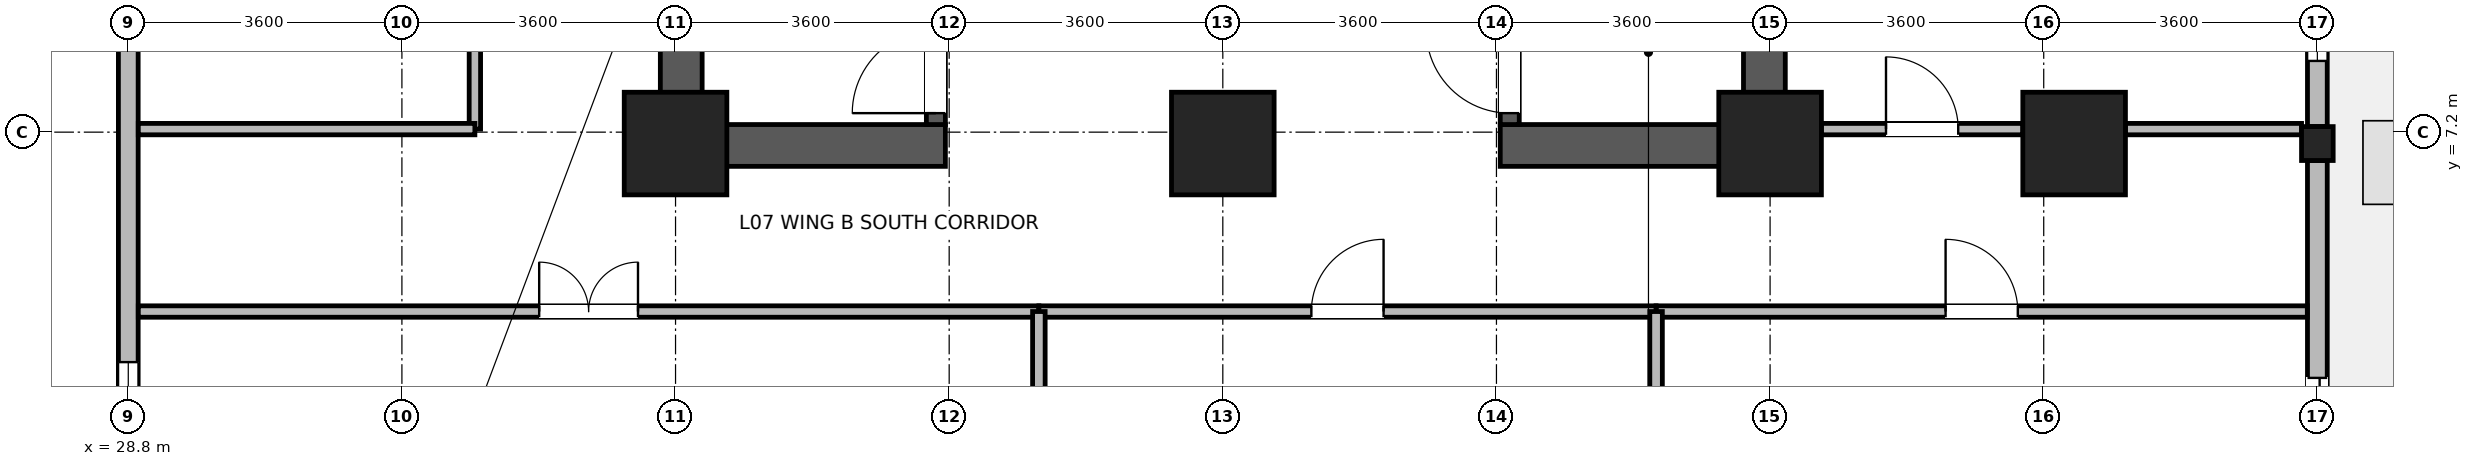
"""IFC4 building model, lengths in metres.
Left out: names, types, materials, properties, quantities, classifications, styles, units other than length and angle.
Written with IfcOpenShell. Run it as: python <this file> out.ifc"""

import sys

from ifc_helpers import new_model, si_unit, direction, frame, frame_2d, origin, origin_2d, place, context, subcontext, project, spatial, rectangle, i_section, extrude, source, transform, mapped, element, fill, save


model = new_model("IFC4")
c1 = context("Model", 3, precision=1e-05, world=origin(), true_north=direction((0.0, 1.0)))
c2 = subcontext(c1, "Body", "Model", "MODEL_VIEW")
j1 = project(units=[si_unit("LENGTHUNIT", "METRE"), si_unit("PLANEANGLEUNIT", "RADIAN")], contexts=[c1])
p1 = place(None, origin())
s1 = spatial("IfcSite", under=j1, at=p1, CompositionType="ELEMENT")
p2 = place(p1, origin())
s2 = spatial("IfcBuilding", under=s1, at=p2, CompositionType="ELEMENT")
p3 = place(p2, frame((0.0, 0.0, 32.7)))
s3 = spatial("IfcBuildingStorey", under=s2, at=p3, CompositionType="ELEMENT", Elevation=32.7)
for number, where, z_axis, x_axis in (
    (1, (36.075, 6.75, 0.0), (0.0, 0.0, 1.0), (0.0, 1.0, 0.0)),
    (2, (50.325, 6.75, 0.0), (0.0, 0.0, 1.0), (0.0, 1.0, 0.0)),
):
    element("IfcWall", number, at=place(p3, frame(where, z_axis=z_axis, x_axis=x_axis)), inside=s3, PredefinedType="SHEAR", context=c2, shape_type="SweptSolid", body=[
        extrude(rectangle(XDim=8.1, YDim=0.55, at=frame_2d((4.05, 0.0))), origin(), (0.0, 0.0, 1.0), 3.45),
    ])
for number, where, z_axis, x_axis in (
    (3, (36.35, 7.025, 0.0), (0.0, 0.0, 1.0), (1.0, 0.0, 0.0)),
    (4, (46.85, 7.025, 0.0), (0.0, 0.0, 1.0), (1.0, 0.0, 0.0)),
):
    element("IfcWall", number, at=place(p3, frame(where, z_axis=z_axis, x_axis=x_axis)), inside=s3, PredefinedType="SHEAR", context=c2, shape_type="SweptSolid", body=[
        extrude(rectangle(XDim=3.2, YDim=0.55, at=frame_2d((1.6, 0.0))), origin(), (0.0, 0.0, 1.0), 3.45),
    ])
p4 = place(p3, frame((39.425, 7.3, 0.0), z_axis=(0.0, 0.0, 1.0), x_axis=(0.0, 1.0, 0.0)))
e5 = element("IfcWall", 5, at=p4, inside=s3, PredefinedType="SHEAR", context=c2, shape_type="SweptSolid", body=[
    extrude(rectangle(XDim=7.0, YDim=0.25, at=frame_2d((3.5, 0.0))), origin(), (0.0, 0.0, 1.0), 3.45),
])
p5 = place(p4, frame((0.15, 0.0, 0.0)))
e6 = element("IfcOpeningElement", 6, at=p5, cuts=e5, PredefinedType="OPENING", context=c2, shape_type="SweptSolid", body=[
    extrude(rectangle(XDim=1.1, YDim=2.08, at=frame_2d((0.55, 1.04))), frame((0.0, 0.135, 0.0), z_axis=(0.0, -1.0, 0.0), x_axis=(1.0, 0.0, 0.0)), (0.0, 0.0, 1.0), 0.27),
])
p6 = place(p3, frame((46.975, 7.3, 0.0), z_axis=(0.0, 0.0, 1.0), x_axis=(0.0, 1.0, 0.0)))
e7 = element("IfcWall", 7, at=p6, inside=s3, PredefinedType="SHEAR", context=c2, shape_type="SweptSolid", body=[
    extrude(rectangle(XDim=7.0, YDim=0.25, at=frame_2d((3.5, 0.0))), origin(), (0.0, 0.0, 1.0), 3.45),
])
p7 = place(p6, frame((0.15, 0.0, 0.0)))
e8 = element("IfcOpeningElement", 8, at=p7, cuts=e7, PredefinedType="OPENING", context=c2, shape_type="SweptSolid", body=[
    extrude(rectangle(XDim=1.1, YDim=2.08, at=frame_2d((0.55, 1.04))), frame((0.0, 0.135, 0.0), z_axis=(0.0, -1.0, 0.0), x_axis=(1.0, 0.0, 0.0)), (0.0, 0.0, 1.0), 0.27),
])
m1 = source(origin(), c2, "Body", "SweptSolid", [
    extrude(rectangle(XDim=1.35, YDim=1.35, at=origin_2d()), origin(), (0.0, 0.0, 1.0), 3.7),
])
for number, where, z_axis, x_axis in (
    (9, (36.0, 7.05, 0.0), (0.0, 0.0, 1.0), (1.0, 0.0, 0.0)),
    (10, (43.2, 7.05, 0.0), (0.0, 0.0, 1.0), (1.0, 0.0, 0.0)),
    (11, (50.4, 7.05, 0.0), (0.0, 0.0, 1.0), (1.0, 0.0, 0.0)),
    (12, (54.4, 7.05, 0.0), (0.0, 0.0, 1.0), (1.0, 0.0, 0.0)),
):
    element("IfcColumn", number, at=place(p3, frame(where, z_axis=z_axis, x_axis=x_axis)), inside=s3, PredefinedType="COLUMN", context=c2, shape_type="MappedRepresentation", body=[
        mapped(m1, transform((0.0, 0.0, 0.0), x_axis=(1.0, 0.0, 0.0), y_axis=(0.0, 1.0, 0.0), z_axis=(0.0, 0.0, 1.0), scale=1.0)),
    ])
m2 = source(origin(), c2, "Body", "SweptSolid", [
    extrude(i_section(OverallWidth=0.416, OverallDepth=0.446, WebThickness=0.029, FlangeThickness=0.04, FilletRadius=0.015, at=origin_2d()), origin(), (0.0, 0.0, 1.0), 3.7),
])
p8 = place(p3, frame((57.6, 7.05, 0.0), z_axis=(0.0, 0.0, 1.0), x_axis=(1.0, 0.0, 0.0)))
e13 = element("IfcColumn", 13, at=p8, inside=s3, PredefinedType="COLUMN", context=c2, shape_type="MappedRepresentation", body=[
    mapped(m2, transform((0.0, 0.0, 0.0), x_axis=(1.0, 0.0, 0.0), y_axis=(0.0, 1.0, 0.0), z_axis=(0.0, 0.0, 1.0), scale=1.0)),
])
p9 = place(p3, frame((57.6, 6.826, 0.0), z_axis=(0.0, 0.0, 1.0), x_axis=(0.0, -1.0, 0.0)))
e14 = element("IfcWall", 14, at=p9, inside=s3, PredefinedType="STANDARD", context=c2, shape_type="SweptSolid", body=[
    extrude(rectangle(XDim=5.156, YDim=0.26, at=frame_2d((2.578, 0.0))), origin(), (0.0, 0.0, 1.0), 3.43),
])
p10 = place(p9, frame((2.859, 0.0, 0.0)))
e15 = element("IfcOpeningElement", 15, at=p10, cuts=e14, PredefinedType="OPENING", context=c2, shape_type="SweptSolid", body=[
    extrude(rectangle(XDim=1.5, YDim=2.15, at=frame_2d((0.75, 1.075))), frame((0.0, 0.14, 0.0), z_axis=(0.0, -1.0, 0.0), x_axis=(1.0, 0.0, 0.0)), (0.0, 0.0, 1.0), 0.28),
])
p11 = place(p3, frame((57.6, 14.326, 0.0), z_axis=(0.0, 0.0, 1.0), x_axis=(0.0, -1.0, 0.0)))
e16 = element("IfcWall", 16, at=p11, inside=s3, PredefinedType="STANDARD", context=c2, shape_type="SweptSolid", body=[
    extrude(rectangle(XDim=7.052, YDim=0.26, at=frame_2d((3.526, 0.0))), origin(), (0.0, 0.0, 1.0), 2.93),
])
p12 = place(p11, frame((0.863, 0.0, 0.85)))
e17 = element("IfcOpeningElement", 17, at=p12, cuts=e16, PredefinedType="OPENING", context=c2, shape_type="SweptSolid", body=[
    extrude(rectangle(XDim=1.8, YDim=1.85, at=frame_2d((0.9, 0.925))), frame((0.0, 0.14, 0.0), z_axis=(0.0, -1.0, 0.0), x_axis=(1.0, 0.0, 0.0)), (0.0, 0.0, 1.0), 0.28),
])
p13 = place(p11, frame((4.389, 0.0, 0.85)))
e18 = element("IfcOpeningElement", 18, at=p13, cuts=e16, PredefinedType="OPENING", context=c2, shape_type="SweptSolid", body=[
    extrude(rectangle(XDim=1.8, YDim=1.85, at=frame_2d((0.9, 0.925))), frame((0.0, 0.14, 0.0), z_axis=(0.0, -1.0, 0.0), x_axis=(1.0, 0.0, 0.0)), (0.0, 0.0, 1.0), 0.28),
])
p14 = place(p3, frame((28.8, 1.67, 0.0), z_axis=(0.0, 0.0, 1.0), x_axis=(0.0, 1.0, 0.0)))
e19 = element("IfcWall", 19, at=p14, inside=s3, PredefinedType="STANDARD", context=c2, shape_type="SweptSolid", body=[
    extrude(rectangle(XDim=19.254, YDim=0.26, at=frame_2d((9.627, 0.0))), origin(), (0.0, 0.0, 1.0), 3.43),
])
p15 = place(p14, frame((0.705, 0.0, 0.85)))
e20 = element("IfcOpeningElement", 20, at=p15, cuts=e19, PredefinedType="OPENING", context=c2, shape_type="SweptSolid", body=[
    extrude(rectangle(XDim=1.8, YDim=1.85, at=frame_2d((0.9, 0.925))), frame((0.0, 0.14, 0.0), z_axis=(0.0, -1.0, 0.0), x_axis=(1.0, 0.0, 0.0)), (0.0, 0.0, 1.0), 0.28),
])
p16 = place(p14, frame((7.123, 0.0, 0.85)))
e21 = element("IfcOpeningElement", 21, at=p16, cuts=e19, PredefinedType="OPENING", context=c2, shape_type="SweptSolid", body=[
    extrude(rectangle(XDim=1.8, YDim=1.85, at=frame_2d((0.9, 0.925))), frame((0.0, 0.14, 0.0), z_axis=(0.0, -1.0, 0.0), x_axis=(1.0, 0.0, 0.0)), (0.0, 0.0, 1.0), 0.28),
])
p17 = place(p14, frame((10.332, 0.0, 0.85)))
e22 = element("IfcOpeningElement", 22, at=p17, cuts=e19, PredefinedType="OPENING", context=c2, shape_type="SweptSolid", body=[
    extrude(rectangle(XDim=1.8, YDim=1.85, at=frame_2d((0.9, 0.925))), frame((0.0, 0.14, 0.0), z_axis=(0.0, -1.0, 0.0), x_axis=(1.0, 0.0, 0.0)), (0.0, 0.0, 1.0), 0.28),
])
p18 = place(p14, frame((13.541, 0.0, 0.85)))
e23 = element("IfcOpeningElement", 23, at=p18, cuts=e19, PredefinedType="OPENING", context=c2, shape_type="SweptSolid", body=[
    extrude(rectangle(XDim=1.8, YDim=1.85, at=frame_2d((0.9, 0.925))), frame((0.0, 0.14, 0.0), z_axis=(0.0, -1.0, 0.0), x_axis=(1.0, 0.0, 0.0)), (0.0, 0.0, 1.0), 0.28),
])
p19 = place(p14, frame((16.75, 0.0, 0.85)))
e24 = element("IfcOpeningElement", 24, at=p19, cuts=e19, PredefinedType="OPENING", context=c2, shape_type="SweptSolid", body=[
    extrude(rectangle(XDim=1.8, YDim=1.85, at=frame_2d((0.9, 0.925))), frame((0.0, 0.14, 0.0), z_axis=(0.0, -1.0, 0.0), x_axis=(1.0, 0.0, 0.0)), (0.0, 0.0, 1.0), 0.28),
])
p20 = place(p3, frame((28.932, 4.84, 0.0), z_axis=(0.0, 0.0, 1.0), x_axis=(1.0, 0.0, 0.0)))
e25 = element("IfcWall", 25, at=p20, inside=s3, PredefinedType="PARTITIONING", context=c2, shape_type="SweptSolid", body=[
    extrude(rectangle(XDim=11.848, YDim=0.15, at=frame_2d((5.924, 0.0))), origin(), (0.0, 0.0, 1.0), 3.43),
])
p21 = place(p20, frame((5.274, 0.0, 0.0)))
e26 = element("IfcOpeningElement", 26, at=p21, cuts=e25, PredefinedType="OPENING", context=c2, shape_type="SweptSolid", body=[
    extrude(rectangle(XDim=1.3, YDim=2.12, at=frame_2d((0.65, 1.06))), frame((0.0, 0.085, 0.0), z_axis=(0.0, -1.0, 0.0), x_axis=(1.0, 0.0, 0.0)), (0.0, 0.0, 1.0), 0.17),
])
p22 = place(p3, frame((48.9, 4.84, 0.0), z_axis=(0.0, 0.0, 1.0), x_axis=(1.0, 0.0, 0.0)))
e27 = element("IfcWall", 27, at=p22, inside=s3, PredefinedType="PARTITIONING", context=c2, shape_type="SweptSolid", body=[
    extrude(rectangle(XDim=8.568, YDim=0.15, at=frame_2d((4.284, 0.0))), origin(), (0.0, 0.0, 1.0), 3.43),
])
p23 = place(p22, frame((3.809, 0.0, 0.0)))
e28 = element("IfcOpeningElement", 28, at=p23, cuts=e27, PredefinedType="OPENING", context=c2, shape_type="SweptSolid", body=[
    extrude(rectangle(XDim=0.95, YDim=2.1, at=frame_2d((0.475, 1.05))), frame((0.0, 0.085, 0.0), z_axis=(0.0, -1.0, 0.0), x_axis=(1.0, 0.0, 0.0)), (0.0, 0.0, 1.0), 0.17),
])
p24 = place(p3, frame((40.78, 4.84, 0.0), z_axis=(0.0, 0.0, 1.0), x_axis=(1.0, 0.0, 0.0)))
e29 = element("IfcWall", 29, at=p24, inside=s3, PredefinedType="PARTITIONING", context=c2, shape_type="SweptSolid", body=[
    extrude(rectangle(XDim=8.12, YDim=0.15, at=frame_2d((4.06, 0.0))), origin(), (0.0, 0.0, 1.0), 3.43),
])
p25 = place(p24, frame((3.585, 0.0, 0.0)))
e30 = element("IfcOpeningElement", 30, at=p25, cuts=e29, PredefinedType="OPENING", context=c2, shape_type="SweptSolid", body=[
    extrude(rectangle(XDim=0.95, YDim=2.1, at=frame_2d((0.475, 1.05))), frame((0.0, 0.085, 0.0), z_axis=(0.0, -1.0, 0.0), x_axis=(1.0, 0.0, 0.0)), (0.0, 0.0, 1.0), 0.17),
])
p26 = place(p3, frame((33.36, 7.24, 0.0), z_axis=(0.0, 0.0, 1.0), x_axis=(0.0, 1.0, 0.0)))
e31 = element("IfcWall", 31, at=p26, inside=s3, PredefinedType="PARTITIONING", context=c2, shape_type="SweptSolid", body=[
    extrude(rectangle(XDim=7.26, YDim=0.15, at=frame_2d((3.63, 0.0))), origin(), (0.0, 0.0, 1.0), 3.43),
])
p27 = place(p26, frame((2.98, 0.0, 0.0)))
e32 = element("IfcOpeningElement", 32, at=p27, cuts=e31, PredefinedType="OPENING", context=c2, shape_type="SweptSolid", body=[
    extrude(rectangle(XDim=1.3, YDim=2.12, at=frame_2d((0.65, 1.06))), frame((0.0, 0.085, 0.0), z_axis=(0.0, -1.0, 0.0), x_axis=(1.0, 0.0, 0.0)), (0.0, 0.0, 1.0), 0.17),
])
p28 = place(p3, frame((51.075, 7.24, 0.0), z_axis=(0.0, 0.0, 1.0), x_axis=(1.0, 0.0, 0.0)))
e33 = element("IfcWall", 33, at=p28, inside=s3, PredefinedType="PARTITIONING", context=c2, shape_type="SweptSolid", body=[
    extrude(rectangle(XDim=2.65, YDim=0.15, at=frame_2d((1.325, 0.0))), origin(), (0.0, 0.0, 1.0), 2.78),
])
p29 = place(p28, frame((0.85, 0.0, 0.0)))
e34 = element("IfcOpeningElement", 34, at=p29, cuts=e33, PredefinedType="OPENING", context=c2, shape_type="SweptSolid", body=[
    extrude(rectangle(XDim=0.95, YDim=2.1, at=frame_2d((0.475, 1.05))), frame((0.0, 0.085, 0.0), z_axis=(0.0, -1.0, 0.0), x_axis=(1.0, 0.0, 0.0)), (0.0, 0.0, 1.0), 0.17),
])
p30 = place(p3, frame((55.075, 7.24, 0.0), z_axis=(0.0, 0.0, 1.0), x_axis=(1.0, 0.0, 0.0)))
e35 = element("IfcWall", 35, at=p30, inside=s3, PredefinedType="PARTITIONING", context=c2, shape_type="SweptSolid", body=[
    extrude(rectangle(XDim=2.317, YDim=0.15, at=frame_2d((1.159, 0.0))), origin(), (0.0, 0.0, 1.0), 2.78),
])
p31 = place(p3, frame((28.932, 7.24, 0.0), z_axis=(0.0, 0.0, 1.0), x_axis=(1.0, 0.0, 0.0)))
e36 = element("IfcWall", 36, at=p31, inside=s3, PredefinedType="PARTITIONING", context=c2, shape_type="SweptSolid", body=[
    extrude(rectangle(XDim=4.428, YDim=0.15, at=frame_2d((2.214, 0.0))), origin(), (0.0, 0.0, 1.0), 3.43),
])
for number, where, z_axis, x_axis in (
    (37, (40.78, 1.932, 0.0), (0.0, 0.0, 1.0), (0.0, 1.0, 0.0)),
    (38, (48.9, 1.932, 0.0), (0.0, 0.0, 1.0), (0.0, 1.0, 0.0)),
):
    element("IfcWall", number, at=place(p3, frame(where, z_axis=z_axis, x_axis=x_axis)), inside=s3, PredefinedType="PARTITIONING", context=c2, shape_type="SweptSolid", body=[
        extrude(rectangle(XDim=2.908, YDim=0.165, at=frame_2d((1.454, 0.0))), origin(), (0.0, 0.0, 1.0), 3.43),
    ])
p32 = place(p10, origin())
e39 = element("IfcDoor", 39, at=p32, inside=s3, OperationType="SLIDING_TO_LEFT", PredefinedType="DOOR", context=c2, shape_type="SweptSolid", body=[
    extrude(rectangle(XDim=1.5, YDim=2.15, at=frame_2d((0.75, 1.075))), frame((0.0, 0.025, 0.0), z_axis=(0.0, -1.0, 0.0), x_axis=(1.0, 0.0, 0.0)), (0.0, 0.0, 1.0), 0.05),
])
fill(e15, e39)
p33 = place(p13, origin())
e40 = element("IfcWindow", 40, at=p33, inside=s3, PartitioningType="SINGLE_PANEL", PredefinedType="WINDOW", context=c2, shape_type="SweptSolid", body=[
    extrude(rectangle(XDim=1.8, YDim=1.85, at=frame_2d((0.9, 0.925))), frame((0.0, 0.03, 0.0), z_axis=(0.0, -1.0, 0.0), x_axis=(1.0, 0.0, 0.0)), (0.0, 0.0, 1.0), 0.06),
])
fill(e18, e40)
p34 = place(p15, origin())
e41 = element("IfcWindow", 41, at=p34, inside=s3, PartitioningType="SINGLE_PANEL", PredefinedType="WINDOW", context=c2, shape_type="SweptSolid", body=[
    extrude(rectangle(XDim=1.8, YDim=1.85, at=frame_2d((0.9, 0.925))), frame((0.0, 0.03, 0.0), z_axis=(0.0, -1.0, 0.0), x_axis=(1.0, 0.0, 0.0)), (0.0, 0.0, 1.0), 0.06),
])
fill(e20, e41)
p35 = place(p5, origin())
e42 = element("IfcDoor", 42, at=p35, inside=s3, OperationType="SINGLE_SWING_LEFT", PredefinedType="DOOR", context=c2, shape_type="SweptSolid", body=[
    extrude(rectangle(XDim=1.1, YDim=2.08, at=frame_2d((0.55, 1.04))), frame((0.0, 0.025, 0.0), z_axis=(0.0, -1.0, 0.0), x_axis=(1.0, 0.0, 0.0)), (0.0, 0.0, 1.0), 0.05),
])
fill(e6, e42)
p36 = place(p7, origin())
e43 = element("IfcDoor", 43, at=p36, inside=s3, OperationType="SINGLE_SWING_RIGHT", PredefinedType="DOOR", context=c2, shape_type="SweptSolid", body=[
    extrude(rectangle(XDim=1.1, YDim=2.08, at=frame_2d((0.55, 1.04))), frame((0.0, 0.025, 0.0), z_axis=(0.0, -1.0, 0.0), x_axis=(1.0, 0.0, 0.0)), (0.0, 0.0, 1.0), 0.05),
])
fill(e8, e43)
p37 = place(p21, origin())
e44 = element("IfcDoor", 44, at=p37, inside=s3, OperationType="DOUBLE_DOOR_SINGLE_SWING", PredefinedType="DOOR", context=c2, shape_type="SweptSolid", body=[
    extrude(rectangle(XDim=1.3, YDim=2.12, at=frame_2d((0.65, 1.06))), frame((0.0, 0.025, 0.0), z_axis=(0.0, -1.0, 0.0), x_axis=(1.0, 0.0, 0.0)), (0.0, 0.0, 1.0), 0.05),
])
fill(e26, e44)
p38 = place(p23, origin())
e45 = element("IfcDoor", 45, at=p38, inside=s3, OperationType="SINGLE_SWING_LEFT", PredefinedType="DOOR", context=c2, shape_type="SweptSolid", body=[
    extrude(rectangle(XDim=0.95, YDim=2.1, at=frame_2d((0.475, 1.05))), frame((0.0, 0.025, 0.0), z_axis=(0.0, -1.0, 0.0), x_axis=(1.0, 0.0, 0.0)), (0.0, 0.0, 1.0), 0.05),
])
fill(e28, e45)
p39 = place(p25, origin())
e46 = element("IfcDoor", 46, at=p39, inside=s3, OperationType="SINGLE_SWING_RIGHT", PredefinedType="DOOR", context=c2, shape_type="SweptSolid", body=[
    extrude(rectangle(XDim=0.95, YDim=2.1, at=frame_2d((0.475, 1.05))), frame((0.0, 0.025, 0.0), z_axis=(0.0, -1.0, 0.0), x_axis=(1.0, 0.0, 0.0)), (0.0, 0.0, 1.0), 0.05),
])
fill(e30, e46)
p40 = place(p29, origin())
e47 = element("IfcDoor", 47, at=p40, inside=s3, OperationType="SINGLE_SWING_LEFT", PredefinedType="DOOR", context=c2, shape_type="SweptSolid", body=[
    extrude(rectangle(XDim=0.95, YDim=2.1, at=frame_2d((0.475, 1.05))), frame((0.0, 0.025, 0.0), z_axis=(0.0, -1.0, 0.0), x_axis=(1.0, 0.0, 0.0)), (0.0, 0.0, 1.0), 0.05),
])
fill(e34, e47)
save(model, sys.argv[1])
